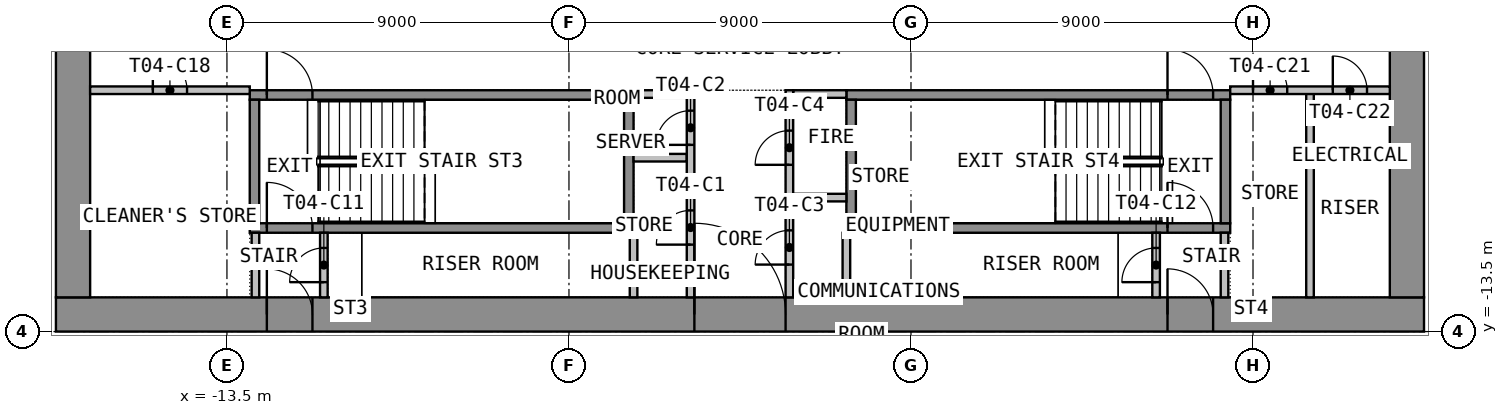
"""IFC4 building model, lengths in metres.
Left out: names, types, materials, properties, quantities, classifications, styles, units other than length and angle.
Written with IfcOpenShell. Run it as: python <this file> out.ifc"""

import sys

from ifc_helpers import new_model, si_unit, direction, frame, frame_2d, origin, place, context, subcontext, project, spatial, rectangle, extrude, element, fill, save


model = new_model("IFC4")
c1 = context("Model", 3, precision=1e-05, world=origin(), true_north=direction((0.0, 1.0)))
c2 = subcontext(c1, "Body", "Model", "MODEL_VIEW")
j1 = project(units=[si_unit("LENGTHUNIT", "METRE"), si_unit("PLANEANGLEUNIT", "RADIAN")], contexts=[c1])
p1 = place(None, origin())
s1 = spatial("IfcSite", under=j1, at=p1, CompositionType="ELEMENT")
p2 = place(p1, origin())
s2 = spatial("IfcBuilding", under=s1, at=p2, CompositionType="ELEMENT")
p3 = place(p2, frame((0.0, 0.0, 65.1)))
s3 = spatial("IfcBuildingStorey", under=s2, at=p3, CompositionType="ELEMENT", Elevation=65.1)
p4 = place(p3, frame((-18.0, -13.05, 0.0), z_axis=(0.0, 0.0, 1.0), x_axis=(1.0, 0.0, 0.0)))
e1 = element("IfcWall", 1, at=p4, inside=s3, PredefinedType="SHEAR", context=c2, shape_type="SweptSolid", body=[
    extrude(rectangle(XDim=36.0, YDim=0.9, at=frame_2d((18.0, 0.0))), origin(), (0.0, 0.0, 1.0), 3.525),
])
p5 = place(p4, frame((16.8, 0.0, 0.0)))
e2 = element("IfcOpeningElement", 2, at=p5, cuts=e1, PredefinedType="OPENING", context=c2, shape_type="SweptSolid", body=[
    extrude(rectangle(XDim=2.4, YDim=2.1, at=frame_2d((1.2, 1.05))), frame((0.0, 0.46, 0.0), z_axis=(0.0, -1.0, 0.0), x_axis=(1.0, 0.0, 0.0)), (0.0, 0.0, 1.0), 0.92),
])
p6 = place(p4, frame((5.55, 0.0, 0.0)))
e3 = element("IfcOpeningElement", 3, at=p6, cuts=e1, PredefinedType="OPENING", context=c2, shape_type="SweptSolid", body=[
    extrude(rectangle(XDim=1.2, YDim=2.1, at=frame_2d((0.6, 1.05))), frame((0.0, 0.46, 0.0), z_axis=(0.0, -1.0, 0.0), x_axis=(1.0, 0.0, 0.0)), (0.0, 0.0, 1.0), 0.92),
])
p7 = place(p4, frame((29.25, 0.0, 0.0)))
e4 = element("IfcOpeningElement", 4, at=p7, cuts=e1, PredefinedType="OPENING", context=c2, shape_type="SweptSolid", body=[
    extrude(rectangle(XDim=1.2, YDim=2.1, at=frame_2d((0.6, 1.05))), frame((0.0, 0.46, 0.0), z_axis=(0.0, -1.0, 0.0), x_axis=(1.0, 0.0, 0.0)), (0.0, 0.0, 1.0), 0.92),
])
p8 = place(p3, frame((-17.55, -12.6, 0.0), z_axis=(0.0, 0.0, 1.0), x_axis=(0.0, 1.0, 0.0)))
e5 = element("IfcWall", 5, at=p8, inside=s3, PredefinedType="SHEAR", context=c2, shape_type="SweptSolid", body=[
    extrude(rectangle(XDim=25.2, YDim=0.9, at=frame_2d((12.6, 0.0))), origin(), (0.0, 0.0, 1.0), 3.525),
])
p9 = place(p8, frame((11.4, 0.0, 0.0)))
e6 = element("IfcOpeningElement", 6, at=p9, cuts=e5, PredefinedType="OPENING", context=c2, shape_type="SweptSolid", body=[
    extrude(rectangle(XDim=2.4, YDim=2.1, at=frame_2d((1.2, 1.05))), frame((0.0, 0.46, 0.0), z_axis=(0.0, -1.0, 0.0), x_axis=(1.0, 0.0, 0.0)), (0.0, 0.0, 1.0), 0.92),
])
p10 = place(p3, frame((17.55, -12.6, 0.0), z_axis=(0.0, 0.0, 1.0), x_axis=(0.0, 1.0, 0.0)))
e7 = element("IfcWall", 7, at=p10, inside=s3, PredefinedType="SHEAR", context=c2, shape_type="SweptSolid", body=[
    extrude(rectangle(XDim=25.2, YDim=0.9, at=frame_2d((12.6, 0.0))), origin(), (0.0, 0.0, 1.0), 3.525),
])
p11 = place(p10, frame((11.4, 0.0, 0.0)))
e8 = element("IfcOpeningElement", 8, at=p11, cuts=e7, PredefinedType="OPENING", context=c2, shape_type="SweptSolid", body=[
    extrude(rectangle(XDim=2.4, YDim=2.1, at=frame_2d((1.2, 1.05))), frame((0.0, 0.46, 0.0), z_axis=(0.0, -1.0, 0.0), x_axis=(1.0, 0.0, 0.0)), (0.0, 0.0, 1.0), 0.92),
])
p12 = place(p3, frame((-12.9, -10.775, 0.0), z_axis=(0.0, 0.0, 1.0), x_axis=(1.0, 0.0, 0.0)))
e9 = element("IfcWall", 9, at=p12, inside=s3, PredefinedType="SHEAR", context=c2, shape_type="SweptSolid", body=[
    extrude(rectangle(XDim=10.1, YDim=0.25, at=frame_2d((5.05, 0.0))), origin(), (0.0, 0.0, 1.0), 3.525),
])
p13 = place(p12, frame((0.45, 0.0, 0.0)))
e10 = element("IfcOpeningElement", 10, at=p13, cuts=e9, PredefinedType="OPENING", context=c2, shape_type="SweptSolid", body=[
    extrude(rectangle(XDim=1.2, YDim=2.1, at=frame_2d((0.6, 1.05))), frame((0.0, 0.135, 0.0), z_axis=(0.0, -1.0, 0.0), x_axis=(1.0, 0.0, 0.0)), (0.0, 0.0, 1.0), 0.27),
])
p14 = place(p3, frame((-12.9, -7.275, 0.0), z_axis=(0.0, 0.0, 1.0), x_axis=(1.0, 0.0, 0.0)))
e11 = element("IfcWall", 11, at=p14, inside=s3, PredefinedType="SHEAR", context=c2, shape_type="SweptSolid", body=[
    extrude(rectangle(XDim=10.1, YDim=0.25, at=frame_2d((5.05, 0.0))), origin(), (0.0, 0.0, 1.0), 3.525),
])
p15 = place(p14, frame((0.45, 0.0, 0.0)))
e12 = element("IfcOpeningElement", 12, at=p15, cuts=e11, PredefinedType="OPENING", context=c2, shape_type="SweptSolid", body=[
    extrude(rectangle(XDim=1.2, YDim=2.1, at=frame_2d((0.6, 1.05))), frame((0.0, 0.135, 0.0), z_axis=(0.0, -1.0, 0.0), x_axis=(1.0, 0.0, 0.0)), (0.0, 0.0, 1.0), 0.27),
])
for number, where, z_axis, x_axis in (
    (13, (-12.775, -10.65, 0.0), (0.0, 0.0, 1.0), (0.0, 1.0, 0.0)),
    (14, (-2.925, -10.65, 0.0), (0.0, 0.0, 1.0), (0.0, 1.0, 0.0)),
):
    element("IfcWall", number, at=place(p3, frame(where, z_axis=z_axis, x_axis=x_axis)), inside=s3, PredefinedType="SHEAR", context=c2, shape_type="SweptSolid", body=[
        extrude(rectangle(XDim=3.25, YDim=0.25, at=frame_2d((1.625, 0.0))), origin(), (0.0, 0.0, 1.0), 3.525),
    ])
p16 = place(p3, frame((2.8, -10.775, 0.0), z_axis=(0.0, 0.0, 1.0), x_axis=(1.0, 0.0, 0.0)))
e15 = element("IfcWall", 15, at=p16, inside=s3, PredefinedType="SHEAR", context=c2, shape_type="SweptSolid", body=[
    extrude(rectangle(XDim=10.1, YDim=0.25, at=frame_2d((5.05, 0.0))), origin(), (0.0, 0.0, 1.0), 3.525),
])
p17 = place(p16, frame((8.45, 0.0, 0.0)))
e16 = element("IfcOpeningElement", 16, at=p17, cuts=e15, PredefinedType="OPENING", context=c2, shape_type="SweptSolid", body=[
    extrude(rectangle(XDim=1.2, YDim=2.1, at=frame_2d((0.6, 1.05))), frame((0.0, 0.135, 0.0), z_axis=(0.0, -1.0, 0.0), x_axis=(1.0, 0.0, 0.0)), (0.0, 0.0, 1.0), 0.27),
])
p18 = place(p3, frame((2.8, -7.275, 0.0), z_axis=(0.0, 0.0, 1.0), x_axis=(1.0, 0.0, 0.0)))
e17 = element("IfcWall", 17, at=p18, inside=s3, PredefinedType="SHEAR", context=c2, shape_type="SweptSolid", body=[
    extrude(rectangle(XDim=10.1, YDim=0.25, at=frame_2d((5.05, 0.0))), origin(), (0.0, 0.0, 1.0), 3.525),
])
p19 = place(p18, frame((8.45, 0.0, 0.0)))
e18 = element("IfcOpeningElement", 18, at=p19, cuts=e17, PredefinedType="OPENING", context=c2, shape_type="SweptSolid", body=[
    extrude(rectangle(XDim=1.2, YDim=2.1, at=frame_2d((0.6, 1.05))), frame((0.0, 0.135, 0.0), z_axis=(0.0, -1.0, 0.0), x_axis=(1.0, 0.0, 0.0)), (0.0, 0.0, 1.0), 0.27),
])
for number, where, z_axis, x_axis in (
    (19, (2.925, -10.65, 0.0), (0.0, 0.0, 1.0), (0.0, 1.0, 0.0)),
    (20, (12.775, -10.65, 0.0), (0.0, 0.0, 1.0), (0.0, 1.0, 0.0)),
):
    element("IfcWall", number, at=place(p3, frame(where, z_axis=z_axis, x_axis=x_axis)), inside=s3, PredefinedType="SHEAR", context=c2, shape_type="SweptSolid", body=[
        extrude(rectangle(XDim=3.25, YDim=0.25, at=frame_2d((1.625, 0.0))), origin(), (0.0, 0.0, 1.0), 3.525),
    ])
for number, where, z_axis, x_axis in (
    (21, (-2.8, -7.25, 0.0), (0.0, 0.0, 1.0), (1.0, 0.0, 0.0)),
    (22, (-2.8, -8.925, 0.0), (0.0, 0.0, 1.0), (1.0, 0.0, 0.0)),
    (23, (1.4, -7.25, 0.0), (0.0, 0.0, 1.0), (1.0, 0.0, 0.0)),
    (24, (1.4, -9.975, 0.0), (0.0, 0.0, 1.0), (1.0, 0.0, 0.0)),
):
    element("IfcWall", number, at=place(p3, frame(where, z_axis=z_axis, x_axis=x_axis)), inside=s3, PredefinedType="PARTITIONING", context=c2, shape_type="SweptSolid", body=[
        extrude(rectangle(XDim=1.4, YDim=0.2, at=frame_2d((0.7, 0.0))), origin(), (0.0, 0.0, 1.0), 3.525),
    ])
p20 = place(p3, frame((-1.3, -12.6, 0.0), z_axis=(0.0, 0.0, 1.0), x_axis=(0.0, 1.0, 0.0)))
e25 = element("IfcWall", 25, at=p20, inside=s3, PredefinedType="PARTITIONING", context=c2, shape_type="SweptSolid", body=[
    extrude(rectangle(XDim=5.45, YDim=0.2, at=frame_2d((2.725, 0.0))), origin(), (0.0, 0.0, 1.0), 3.525),
])
p21 = place(p20, frame((1.387, 0.0, 0.0)))
e26 = element("IfcOpeningElement", 26, at=p21, cuts=e25, PredefinedType="OPENING", context=c2, shape_type="SweptSolid", body=[
    extrude(rectangle(XDim=0.9, YDim=2.1, at=frame_2d((0.45, 1.05))), frame((0.0, 0.11, 0.0), z_axis=(0.0, -1.0, 0.0), x_axis=(1.0, 0.0, 0.0)), (0.0, 0.0, 1.0), 0.22),
])
p22 = place(p20, frame((4.012, 0.0, 0.0)))
e27 = element("IfcOpeningElement", 27, at=p22, cuts=e25, PredefinedType="OPENING", context=c2, shape_type="SweptSolid", body=[
    extrude(rectangle(XDim=0.9, YDim=2.1, at=frame_2d((0.45, 1.05))), frame((0.0, 0.11, 0.0), z_axis=(0.0, -1.0, 0.0), x_axis=(1.0, 0.0, 0.0)), (0.0, 0.0, 1.0), 0.22),
])
p23 = place(p3, frame((1.3, -12.6, 0.0), z_axis=(0.0, 0.0, 1.0), x_axis=(0.0, 1.0, 0.0)))
e28 = element("IfcWall", 28, at=p23, inside=s3, PredefinedType="PARTITIONING", context=c2, shape_type="SweptSolid", body=[
    extrude(rectangle(XDim=5.45, YDim=0.2, at=frame_2d((2.725, 0.0))), origin(), (0.0, 0.0, 1.0), 3.525),
])
p24 = place(p23, frame((0.863, 0.0, 0.0)))
e29 = element("IfcOpeningElement", 29, at=p24, cuts=e28, PredefinedType="OPENING", context=c2, shape_type="SweptSolid", body=[
    extrude(rectangle(XDim=0.9, YDim=2.1, at=frame_2d((0.45, 1.05))), frame((0.0, 0.11, 0.0), z_axis=(0.0, -1.0, 0.0), x_axis=(1.0, 0.0, 0.0)), (0.0, 0.0, 1.0), 0.22),
])
p25 = place(p23, frame((3.488, 0.0, 0.0)))
e30 = element("IfcOpeningElement", 30, at=p25, cuts=e28, PredefinedType="OPENING", context=c2, shape_type="SweptSolid", body=[
    extrude(rectangle(XDim=0.9, YDim=2.1, at=frame_2d((0.45, 1.05))), frame((0.0, 0.11, 0.0), z_axis=(0.0, -1.0, 0.0), x_axis=(1.0, 0.0, 0.0)), (0.0, 0.0, 1.0), 0.22),
])
p26 = place(p3, frame((-12.75, -12.6, 0.0), z_axis=(0.0, 0.0, 1.0), x_axis=(0.0, 1.0, 0.0)))
e31 = element("IfcWall", 31, at=p26, inside=s3, PredefinedType="PARTITIONING", context=c2, shape_type="SweptSolid", body=[
    extrude(rectangle(XDim=1.7, YDim=0.2, at=frame_2d((0.85, 0.0))), origin(), (0.0, 0.0, 1.0), 3.525),
])
p27 = place(p3, frame((-10.95, -12.6, 0.0), z_axis=(0.0, 0.0, 1.0), x_axis=(0.0, 1.0, 0.0)))
e32 = element("IfcWall", 32, at=p27, inside=s3, PredefinedType="PARTITIONING", context=c2, shape_type="SweptSolid", body=[
    extrude(rectangle(XDim=1.7, YDim=0.2, at=frame_2d((0.85, 0.0))), origin(), (0.0, 0.0, 1.0), 3.525),
])
p28 = place(p27, frame((0.4, 0.0, 0.0)))
e33 = element("IfcOpeningElement", 33, at=p28, cuts=e32, PredefinedType="OPENING", context=c2, shape_type="SweptSolid", body=[
    extrude(rectangle(XDim=0.9, YDim=2.1, at=frame_2d((0.45, 1.05))), frame((0.0, 0.11, 0.0), z_axis=(0.0, -1.0, 0.0), x_axis=(1.0, 0.0, 0.0)), (0.0, 0.0, 1.0), 0.22),
])
p29 = place(p3, frame((12.75, -12.6, 0.0), z_axis=(0.0, 0.0, 1.0), x_axis=(0.0, 1.0, 0.0)))
e34 = element("IfcWall", 34, at=p29, inside=s3, PredefinedType="PARTITIONING", context=c2, shape_type="SweptSolid", body=[
    extrude(rectangle(XDim=1.7, YDim=0.2, at=frame_2d((0.85, 0.0))), origin(), (0.0, 0.0, 1.0), 3.525),
])
p30 = place(p3, frame((10.95, -12.6, 0.0), z_axis=(0.0, 0.0, 1.0), x_axis=(0.0, 1.0, 0.0)))
e35 = element("IfcWall", 35, at=p30, inside=s3, PredefinedType="PARTITIONING", context=c2, shape_type="SweptSolid", body=[
    extrude(rectangle(XDim=1.7, YDim=0.2, at=frame_2d((0.85, 0.0))), origin(), (0.0, 0.0, 1.0), 3.525),
])
p31 = place(p30, frame((0.4, 0.0, 0.0)))
e36 = element("IfcOpeningElement", 36, at=p31, cuts=e35, PredefinedType="OPENING", context=c2, shape_type="SweptSolid", body=[
    extrude(rectangle(XDim=0.9, YDim=2.1, at=frame_2d((0.45, 1.05))), frame((0.0, 0.11, 0.0), z_axis=(0.0, -1.0, 0.0), x_axis=(1.0, 0.0, 0.0)), (0.0, 0.0, 1.0), 0.22),
])
p32 = place(p3, frame((-17.1, -7.15, 0.0), z_axis=(0.0, 0.0, 1.0), x_axis=(1.0, 0.0, 0.0)))
e37 = element("IfcWall", 37, at=p32, inside=s3, PredefinedType="PARTITIONING", context=c2, shape_type="SweptSolid", body=[
    extrude(rectangle(XDim=4.2, YDim=0.2, at=frame_2d((2.1, 0.0))), origin(), (0.0, 0.0, 1.0), 3.525),
])
p33 = place(p32, frame((1.65, 0.0, 0.0)))
e38 = element("IfcOpeningElement", 38, at=p33, cuts=e37, PredefinedType="OPENING", context=c2, shape_type="SweptSolid", body=[
    extrude(rectangle(XDim=0.9, YDim=2.1, at=frame_2d((0.45, 1.05))), frame((0.0, 0.11, 0.0), z_axis=(0.0, -1.0, 0.0), x_axis=(1.0, 0.0, 0.0)), (0.0, 0.0, 1.0), 0.22),
])
p34 = place(p3, frame((15.0, -12.6, 0.0), z_axis=(0.0, 0.0, 1.0), x_axis=(0.0, 1.0, 0.0)))
e39 = element("IfcWall", 39, at=p34, inside=s3, PredefinedType="PARTITIONING", context=c2, shape_type="SweptSolid", body=[
    extrude(rectangle(XDim=5.45, YDim=0.2, at=frame_2d((2.725, 0.0))), origin(), (0.0, 0.0, 1.0), 3.525),
])
p35 = place(p3, frame((12.9, -7.15, 0.0), z_axis=(0.0, 0.0, 1.0), x_axis=(1.0, 0.0, 0.0)))
e40 = element("IfcWall", 40, at=p35, inside=s3, PredefinedType="PARTITIONING", context=c2, shape_type="SweptSolid", body=[
    extrude(rectangle(XDim=4.2, YDim=0.2, at=frame_2d((2.1, 0.0))), origin(), (0.0, 0.0, 1.0), 3.525),
])
p36 = place(p35, frame((0.6, 0.0, 0.0)))
e41 = element("IfcOpeningElement", 41, at=p36, cuts=e40, PredefinedType="OPENING", context=c2, shape_type="SweptSolid", body=[
    extrude(rectangle(XDim=0.9, YDim=2.1, at=frame_2d((0.45, 1.05))), frame((0.0, 0.11, 0.0), z_axis=(0.0, -1.0, 0.0), x_axis=(1.0, 0.0, 0.0)), (0.0, 0.0, 1.0), 0.22),
])
p37 = place(p35, frame((2.7, 0.0, 0.0)))
e42 = element("IfcOpeningElement", 42, at=p37, cuts=e40, PredefinedType="OPENING", context=c2, shape_type="SweptSolid", body=[
    extrude(rectangle(XDim=0.9, YDim=2.1, at=frame_2d((0.45, 1.05))), frame((0.0, 0.11, 0.0), z_axis=(0.0, -1.0, 0.0), x_axis=(1.0, 0.0, 0.0)), (0.0, 0.0, 1.0), 0.22),
])
for number, where, z_axis, x_axis in (
    (43, (-2.8, -12.599, 0.0), (0.0, 0.0, 1.0), (0.0, 1.0, 0.0)),
    (44, (2.8, -10.901, 0.0), (0.0, 0.0, 1.0), (0.0, -1.0, 0.0)),
):
    element("IfcWall", number, at=place(p3, frame(where, z_axis=z_axis, x_axis=x_axis)), inside=s3, PredefinedType="PARTITIONING", context=c2, shape_type="SweptSolid", body=[
        extrude(rectangle(XDim=1.698, YDim=0.2, at=frame_2d((0.849, 0.0))), origin(), (0.0, 0.0, 1.0), 3.525),
    ])
p38 = place(p5, origin())
e45 = element("IfcDoor", 45, at=p38, inside=s3, OperationType="DOUBLE_DOOR_DOUBLE_SWING", PredefinedType="DOOR", context=c2, shape_type="SweptSolid", body=[
    extrude(rectangle(XDim=2.4, YDim=2.1, at=frame_2d((1.2, 1.05))), frame((0.0, 0.025, 0.0), z_axis=(0.0, -1.0, 0.0), x_axis=(1.0, 0.0, 0.0)), (0.0, 0.0, 1.0), 0.05),
])
fill(e2, e45)
p39 = place(p6, origin())
e46 = element("IfcDoor", 46, at=p39, inside=s3, OperationType="SINGLE_SWING_RIGHT", PredefinedType="DOOR", context=c2, shape_type="SweptSolid", body=[
    extrude(rectangle(XDim=1.2, YDim=2.1, at=frame_2d((0.6, 1.05))), frame((0.0, 0.025, 0.0), z_axis=(0.0, -1.0, 0.0), x_axis=(1.0, 0.0, 0.0)), (0.0, 0.0, 1.0), 0.05),
])
fill(e3, e46)
p40 = place(p7, origin())
e47 = element("IfcDoor", 47, at=p40, inside=s3, OperationType="SINGLE_SWING_RIGHT", PredefinedType="DOOR", context=c2, shape_type="SweptSolid", body=[
    extrude(rectangle(XDim=1.2, YDim=2.1, at=frame_2d((0.6, 1.05))), frame((0.0, 0.025, 0.0), z_axis=(0.0, -1.0, 0.0), x_axis=(1.0, 0.0, 0.0)), (0.0, 0.0, 1.0), 0.05),
])
fill(e4, e47)
p41 = place(p15, origin())
e48 = element("IfcDoor", 48, at=p41, inside=s3, OperationType="SINGLE_SWING_LEFT", PredefinedType="DOOR", context=c2, shape_type="SweptSolid", body=[
    extrude(rectangle(XDim=1.2, YDim=2.1, at=frame_2d((0.6, 1.05))), frame((0.0, 0.025, 0.0), z_axis=(0.0, -1.0, 0.0), x_axis=(1.0, 0.0, 0.0)), (0.0, 0.0, 1.0), 0.05),
])
fill(e12, e48)
p42 = place(p19, origin())
e49 = element("IfcDoor", 49, at=p42, inside=s3, OperationType="SINGLE_SWING_LEFT", PredefinedType="DOOR", context=c2, shape_type="SweptSolid", body=[
    extrude(rectangle(XDim=1.2, YDim=2.1, at=frame_2d((0.6, 1.05))), frame((0.0, 0.025, 0.0), z_axis=(0.0, -1.0, 0.0), x_axis=(1.0, 0.0, 0.0)), (0.0, 0.0, 1.0), 0.05),
])
fill(e18, e49)
p43 = place(p21, origin())
e50 = element("IfcDoor", 50, at=p43, inside=s3, OperationType="SINGLE_SWING_LEFT", PredefinedType="DOOR", context=c2, shape_type="SweptSolid", body=[
    extrude(rectangle(XDim=0.9, YDim=2.1, at=frame_2d((0.45, 1.05))), frame((0.0, 0.025, 0.0), z_axis=(0.0, -1.0, 0.0), x_axis=(1.0, 0.0, 0.0)), (0.0, 0.0, 1.0), 0.05),
])
fill(e26, e50)
p44 = place(p22, origin())
e51 = element("IfcDoor", 51, at=p44, inside=s3, OperationType="SINGLE_SWING_LEFT", PredefinedType="DOOR", context=c2, shape_type="SweptSolid", body=[
    extrude(rectangle(XDim=0.9, YDim=2.1, at=frame_2d((0.45, 1.05))), frame((0.0, 0.025, 0.0), z_axis=(0.0, -1.0, 0.0), x_axis=(1.0, 0.0, 0.0)), (0.0, 0.0, 1.0), 0.05),
])
fill(e27, e51)
p45 = place(p24, origin())
e52 = element("IfcDoor", 52, at=p45, inside=s3, OperationType="SINGLE_SWING_LEFT", PredefinedType="DOOR", context=c2, shape_type="SweptSolid", body=[
    extrude(rectangle(XDim=0.9, YDim=2.1, at=frame_2d((0.45, 1.05))), frame((0.0, 0.025, 0.0), z_axis=(0.0, -1.0, 0.0), x_axis=(1.0, 0.0, 0.0)), (0.0, 0.0, 1.0), 0.05),
])
fill(e29, e52)
p46 = place(p25, origin())
e53 = element("IfcDoor", 53, at=p46, inside=s3, OperationType="SINGLE_SWING_LEFT", PredefinedType="DOOR", context=c2, shape_type="SweptSolid", body=[
    extrude(rectangle(XDim=0.9, YDim=2.1, at=frame_2d((0.45, 1.05))), frame((0.0, 0.025, 0.0), z_axis=(0.0, -1.0, 0.0), x_axis=(1.0, 0.0, 0.0)), (0.0, 0.0, 1.0), 0.05),
])
fill(e30, e53)
p47 = place(p13, origin())
e54 = element("IfcDoor", 54, at=p47, inside=s3, OperationType="SINGLE_SWING_RIGHT", PredefinedType="DOOR", context=c2, shape_type="SweptSolid", body=[
    extrude(rectangle(XDim=1.2, YDim=2.1, at=frame_2d((0.6, 1.05))), frame((0.0, 0.025, 0.0), z_axis=(0.0, -1.0, 0.0), x_axis=(1.0, 0.0, 0.0)), (0.0, 0.0, 1.0), 0.05),
])
fill(e10, e54)
p48 = place(p28, origin())
e55 = element("IfcDoor", 55, at=p48, inside=s3, OperationType="SINGLE_SWING_LEFT", PredefinedType="DOOR", context=c2, shape_type="SweptSolid", body=[
    extrude(rectangle(XDim=0.9, YDim=2.1, at=frame_2d((0.45, 1.05))), frame((0.0, 0.025, 0.0), z_axis=(0.0, -1.0, 0.0), x_axis=(1.0, 0.0, 0.0)), (0.0, 0.0, 1.0), 0.05),
])
fill(e33, e55)
p49 = place(p17, origin())
e56 = element("IfcDoor", 56, at=p49, inside=s3, OperationType="SINGLE_SWING_RIGHT", PredefinedType="DOOR", context=c2, shape_type="SweptSolid", body=[
    extrude(rectangle(XDim=1.2, YDim=2.1, at=frame_2d((0.6, 1.05))), frame((0.0, 0.025, 0.0), z_axis=(0.0, -1.0, 0.0), x_axis=(1.0, 0.0, 0.0)), (0.0, 0.0, 1.0), 0.05),
])
fill(e16, e56)
p50 = place(p31, origin())
e57 = element("IfcDoor", 57, at=p50, inside=s3, OperationType="SINGLE_SWING_LEFT", PredefinedType="DOOR", context=c2, shape_type="SweptSolid", body=[
    extrude(rectangle(XDim=0.9, YDim=2.1, at=frame_2d((0.45, 1.05))), frame((0.0, 0.025, 0.0), z_axis=(0.0, -1.0, 0.0), x_axis=(1.0, 0.0, 0.0)), (0.0, 0.0, 1.0), 0.05),
])
fill(e36, e57)
p51 = place(p33, origin())
e58 = element("IfcDoor", 58, at=p51, inside=s3, OperationType="SINGLE_SWING_LEFT", PredefinedType="DOOR", context=c2, shape_type="SweptSolid", body=[
    extrude(rectangle(XDim=0.9, YDim=2.1, at=frame_2d((0.45, 1.05))), frame((0.0, 0.025, 0.0), z_axis=(0.0, -1.0, 0.0), x_axis=(1.0, 0.0, 0.0)), (0.0, 0.0, 1.0), 0.05),
])
fill(e38, e58)
p52 = place(p36, origin())
e59 = element("IfcDoor", 59, at=p52, inside=s3, OperationType="SINGLE_SWING_LEFT", PredefinedType="DOOR", context=c2, shape_type="SweptSolid", body=[
    extrude(rectangle(XDim=0.9, YDim=2.1, at=frame_2d((0.45, 1.05))), frame((0.0, 0.025, 0.0), z_axis=(0.0, -1.0, 0.0), x_axis=(1.0, 0.0, 0.0)), (0.0, 0.0, 1.0), 0.05),
])
fill(e41, e59)
p53 = place(p37, origin())
e60 = element("IfcDoor", 60, at=p53, inside=s3, OperationType="SINGLE_SWING_LEFT", PredefinedType="DOOR", context=c2, shape_type="SweptSolid", body=[
    extrude(rectangle(XDim=0.9, YDim=2.1, at=frame_2d((0.45, 1.05))), frame((0.0, 0.025, 0.0), z_axis=(0.0, -1.0, 0.0), x_axis=(1.0, 0.0, 0.0)), (0.0, 0.0, 1.0), 0.05),
])
fill(e42, e60)
save(model, sys.argv[1])
